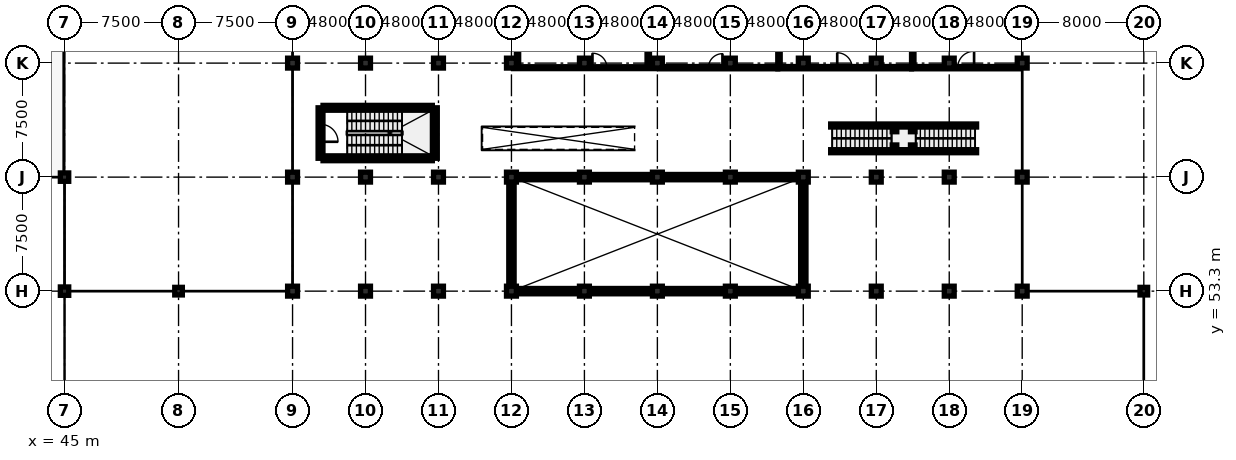
"""IFC4 building model, lengths in metres.
Left out: names, types, materials, properties, quantities, classifications, styles, units other than length and angle.
Written with IfcOpenShell. Run it as: python <this file> out.ifc"""

import sys

from ifc_helpers import new_model, si_unit, direction, frame, frame_2d, origin, origin_2d, place, context, subcontext, project, spatial, rectangle, circle, i_section, extrude, element, fill, save


model = new_model("IFC4")
c1 = context("Model", 3, precision=1e-05, world=origin(), true_north=direction((0.0, 1.0)))
c2 = subcontext(c1, "Body", "Model", "MODEL_VIEW")
j1 = project(units=[si_unit("LENGTHUNIT", "METRE"), si_unit("PLANEANGLEUNIT", "RADIAN")], contexts=[c1])
p1 = place(None, origin())
s1 = spatial("IfcSite", under=j1, at=p1, CompositionType="ELEMENT")
p2 = place(p1, origin())
s2 = spatial("IfcBuilding", under=s1, at=p2, CompositionType="ELEMENT")
p3 = place(p2, frame((0.0, 0.0, 5.0)))
s3 = spatial("IfcBuildingStorey", under=s2, at=p3, CompositionType="ELEMENT", Elevation=5.0)
for number, where, z_axis, x_axis in (
    (1, (45.0, 53.3, 0.0), (0.0, 0.0, 1.0), (1.0, 0.0, 0.0)),
    (2, (45.0, 60.8, 0.0), (0.0, 0.0, 1.0), (1.0, 0.0, 0.0)),
):
    element("IfcColumn", number, at=place(p3, frame(where, z_axis=z_axis, x_axis=x_axis)), inside=s3, PredefinedType="COLUMN", context=c2, shape_type="SweptSolid", body=[
        extrude(rectangle(XDim=0.55, YDim=0.55, at=origin_2d()), origin(), (0.0, 0.0, 1.0), 4.2),
    ])
p4 = place(p3, frame((52.5, 53.3, 0.0), z_axis=(0.0, 0.0, 1.0), x_axis=(1.0, 0.0, 0.0)))
e3 = element("IfcColumn", 3, at=p4, inside=s3, PredefinedType="COLUMN", context=c2, shape_type="SweptSolid", body=[
    extrude(rectangle(XDim=0.5, YDim=0.5, at=origin_2d()), origin(), (0.0, 0.0, 1.0), 4.206),
])
p5 = place(p3, frame((60.0, 53.3, 0.0), z_axis=(0.0, 0.0, 1.0), x_axis=(1.0, 0.0, 0.0)))
e4 = element("IfcColumn", 4, at=p5, inside=s3, PredefinedType="COLUMN", context=c2, shape_type="SweptSolid", body=[
    extrude(circle(Radius=0.325, at=origin_2d()), origin(), (0.0, 0.0, 1.0), 5.4),
])
for number, where, z_axis, x_axis in (
    (5, (60.0, 60.8, 0.0), (0.0, 0.0, 1.0), (1.0, 0.0, 0.0)),
    (6, (60.0, 68.3, 0.0), (0.0, 0.0, 1.0), (1.0, 0.0, 0.0)),
):
    element("IfcColumn", number, at=place(p3, frame(where, z_axis=z_axis, x_axis=x_axis)), inside=s3, PredefinedType="COLUMN", context=c2, shape_type="SweptSolid", body=[
        extrude(circle(Radius=0.325, at=origin_2d()), origin(), (0.0, 0.0, 1.0), 4.2),
    ])
p6 = place(p3, frame((64.8, 53.3, 0.0), z_axis=(0.0, 0.0, 1.0), x_axis=(1.0, 0.0, 0.0)))
e7 = element("IfcColumn", 7, at=p6, inside=s3, PredefinedType="COLUMN", context=c2, shape_type="SweptSolid", body=[
    extrude(circle(Radius=0.325, at=origin_2d()), origin(), (0.0, 0.0, 1.0), 5.4),
])
for number, where, z_axis, x_axis in (
    (8, (64.8, 60.8, 0.0), (0.0, 0.0, 1.0), (1.0, 0.0, 0.0)),
    (9, (64.8, 68.3, 0.0), (0.0, 0.0, 1.0), (1.0, 0.0, 0.0)),
):
    element("IfcColumn", number, at=place(p3, frame(where, z_axis=z_axis, x_axis=x_axis)), inside=s3, PredefinedType="COLUMN", context=c2, shape_type="SweptSolid", body=[
        extrude(circle(Radius=0.325, at=origin_2d()), origin(), (0.0, 0.0, 1.0), 4.2),
    ])
p7 = place(p3, frame((69.6, 53.3, 0.0), z_axis=(0.0, 0.0, 1.0), x_axis=(1.0, 0.0, 0.0)))
e10 = element("IfcColumn", 10, at=p7, inside=s3, PredefinedType="COLUMN", context=c2, shape_type="SweptSolid", body=[
    extrude(circle(Radius=0.325, at=origin_2d()), origin(), (0.0, 0.0, 1.0), 5.4),
])
for number, where, z_axis, x_axis in (
    (11, (69.6, 60.8, 0.0), (0.0, 0.0, 1.0), (1.0, 0.0, 0.0)),
    (12, (69.6, 68.3, 0.0), (0.0, 0.0, 1.0), (1.0, 0.0, 0.0)),
):
    element("IfcColumn", number, at=place(p3, frame(where, z_axis=z_axis, x_axis=x_axis)), inside=s3, PredefinedType="COLUMN", context=c2, shape_type="SweptSolid", body=[
        extrude(circle(Radius=0.325, at=origin_2d()), origin(), (0.0, 0.0, 1.0), 4.2),
    ])
p8 = place(p3, frame((74.4, 53.3, 0.0), z_axis=(0.0, 0.0, 1.0), x_axis=(1.0, 0.0, 0.0)))
e13 = element("IfcColumn", 13, at=p8, inside=s3, PredefinedType="COLUMN", context=c2, shape_type="SweptSolid", body=[
    extrude(circle(Radius=0.325, at=origin_2d()), origin(), (0.0, 0.0, 1.0), 5.4),
])
p9 = place(p3, frame((74.4, 68.3, 0.0), z_axis=(0.0, 0.0, 1.0), x_axis=(1.0, 0.0, 0.0)))
e14 = element("IfcColumn", 14, at=p9, inside=s3, PredefinedType="COLUMN", context=c2, shape_type="SweptSolid", body=[
    extrude(circle(Radius=0.325, at=origin_2d()), origin(), (0.0, 0.0, 1.0), 4.2),
])
p10 = place(p3, frame((79.2, 53.3, 0.0), z_axis=(0.0, 0.0, 1.0), x_axis=(1.0, 0.0, 0.0)))
e15 = element("IfcColumn", 15, at=p10, inside=s3, PredefinedType="COLUMN", context=c2, shape_type="SweptSolid", body=[
    extrude(circle(Radius=0.325, at=origin_2d()), origin(), (0.0, 0.0, 1.0), 5.4),
])
p11 = place(p3, frame((79.2, 68.3, 0.0), z_axis=(0.0, 0.0, 1.0), x_axis=(1.0, 0.0, 0.0)))
e16 = element("IfcColumn", 16, at=p11, inside=s3, PredefinedType="COLUMN", context=c2, shape_type="SweptSolid", body=[
    extrude(circle(Radius=0.325, at=origin_2d()), origin(), (0.0, 0.0, 1.0), 4.2),
])
p12 = place(p3, frame((84.0, 53.3, 0.0), z_axis=(0.0, 0.0, 1.0), x_axis=(1.0, 0.0, 0.0)))
e17 = element("IfcColumn", 17, at=p12, inside=s3, PredefinedType="COLUMN", context=c2, shape_type="SweptSolid", body=[
    extrude(circle(Radius=0.325, at=origin_2d()), origin(), (0.0, 0.0, 1.0), 5.4),
])
p13 = place(p3, frame((84.0, 68.3, 0.0), z_axis=(0.0, 0.0, 1.0), x_axis=(1.0, 0.0, 0.0)))
e18 = element("IfcColumn", 18, at=p13, inside=s3, PredefinedType="COLUMN", context=c2, shape_type="SweptSolid", body=[
    extrude(circle(Radius=0.325, at=origin_2d()), origin(), (0.0, 0.0, 1.0), 4.2),
])
p14 = place(p3, frame((88.8, 53.3, 0.0), z_axis=(0.0, 0.0, 1.0), x_axis=(1.0, 0.0, 0.0)))
e19 = element("IfcColumn", 19, at=p14, inside=s3, PredefinedType="COLUMN", context=c2, shape_type="SweptSolid", body=[
    extrude(circle(Radius=0.325, at=origin_2d()), origin(), (0.0, 0.0, 1.0), 5.4),
])
for number, where, z_axis, x_axis in (
    (20, (88.8, 60.8, 0.0), (0.0, 0.0, 1.0), (1.0, 0.0, 0.0)),
    (21, (88.8, 68.3, 0.0), (0.0, 0.0, 1.0), (1.0, 0.0, 0.0)),
):
    element("IfcColumn", number, at=place(p3, frame(where, z_axis=z_axis, x_axis=x_axis)), inside=s3, PredefinedType="COLUMN", context=c2, shape_type="SweptSolid", body=[
        extrude(circle(Radius=0.325, at=origin_2d()), origin(), (0.0, 0.0, 1.0), 4.2),
    ])
p15 = place(p3, frame((93.6, 53.3, 0.0), z_axis=(0.0, 0.0, 1.0), x_axis=(1.0, 0.0, 0.0)))
e22 = element("IfcColumn", 22, at=p15, inside=s3, PredefinedType="COLUMN", context=c2, shape_type="SweptSolid", body=[
    extrude(circle(Radius=0.325, at=origin_2d()), origin(), (0.0, 0.0, 1.0), 5.4),
])
for number, where, z_axis, x_axis in (
    (23, (93.6, 60.8, 0.0), (0.0, 0.0, 1.0), (1.0, 0.0, 0.0)),
    (24, (93.6, 68.3, 0.0), (0.0, 0.0, 1.0), (1.0, 0.0, 0.0)),
):
    element("IfcColumn", number, at=place(p3, frame(where, z_axis=z_axis, x_axis=x_axis)), inside=s3, PredefinedType="COLUMN", context=c2, shape_type="SweptSolid", body=[
        extrude(circle(Radius=0.325, at=origin_2d()), origin(), (0.0, 0.0, 1.0), 4.2),
    ])
p16 = place(p3, frame((98.4, 53.3, 0.0), z_axis=(0.0, 0.0, 1.0), x_axis=(1.0, 0.0, 0.0)))
e25 = element("IfcColumn", 25, at=p16, inside=s3, PredefinedType="COLUMN", context=c2, shape_type="SweptSolid", body=[
    extrude(circle(Radius=0.325, at=origin_2d()), origin(), (0.0, 0.0, 1.0), 5.4),
])
p17 = place(p3, frame((98.4, 68.3, 0.0), z_axis=(0.0, 0.0, 1.0), x_axis=(1.0, 0.0, 0.0)))
e26 = element("IfcColumn", 26, at=p17, inside=s3, PredefinedType="COLUMN", context=c2, shape_type="SweptSolid", body=[
    extrude(circle(Radius=0.325, at=origin_2d()), origin(), (0.0, 0.0, 1.0), 4.2),
])
p18 = place(p3, frame((103.2, 53.3, 0.0), z_axis=(0.0, 0.0, 1.0), x_axis=(1.0, 0.0, 0.0)))
e27 = element("IfcColumn", 27, at=p18, inside=s3, PredefinedType="COLUMN", context=c2, shape_type="SweptSolid", body=[
    extrude(circle(Radius=0.325, at=origin_2d()), origin(), (0.0, 0.0, 1.0), 5.4),
])
p19 = place(p3, frame((103.2, 68.3, 0.0), z_axis=(0.0, 0.0, 1.0), x_axis=(1.0, 0.0, 0.0)))
e28 = element("IfcColumn", 28, at=p19, inside=s3, PredefinedType="COLUMN", context=c2, shape_type="SweptSolid", body=[
    extrude(circle(Radius=0.325, at=origin_2d()), origin(), (0.0, 0.0, 1.0), 4.2),
])
p20 = place(p3, frame((108.0, 53.3, 0.0), z_axis=(0.0, 0.0, 1.0), x_axis=(1.0, 0.0, 0.0)))
e29 = element("IfcColumn", 29, at=p20, inside=s3, PredefinedType="COLUMN", context=c2, shape_type="SweptSolid", body=[
    extrude(circle(Radius=0.325, at=origin_2d()), origin(), (0.0, 0.0, 1.0), 5.4),
])
for number, where, z_axis, x_axis in (
    (30, (108.0, 60.8, 0.0), (0.0, 0.0, 1.0), (1.0, 0.0, 0.0)),
    (31, (108.0, 68.3, 0.0), (0.0, 0.0, 1.0), (1.0, 0.0, 0.0)),
):
    element("IfcColumn", number, at=place(p3, frame(where, z_axis=z_axis, x_axis=x_axis)), inside=s3, PredefinedType="COLUMN", context=c2, shape_type="SweptSolid", body=[
        extrude(circle(Radius=0.325, at=origin_2d()), origin(), (0.0, 0.0, 1.0), 4.2),
    ])
p21 = place(p3, frame((116.0, 53.3, 0.0), z_axis=(0.0, 0.0, 1.0), x_axis=(1.0, 0.0, 0.0)))
e32 = element("IfcColumn", 32, at=p21, inside=s3, PredefinedType="COLUMN", context=c2, shape_type="SweptSolid", body=[
    extrude(rectangle(XDim=0.5, YDim=0.5, at=origin_2d()), origin(), (0.0, 0.0, 1.0), 4.206),
])
for number, where, z_axis, x_axis in (
    (33, (74.4, 60.8, 0.0), (0.0, 0.0, 1.0), (1.0, 0.0, 0.0)),
    (34, (79.2, 60.8, 0.0), (0.0, 0.0, 1.0), (1.0, 0.0, 0.0)),
    (35, (84.0, 60.8, 0.0), (0.0, 0.0, 1.0), (1.0, 0.0, 0.0)),
    (36, (98.4, 60.8, 0.0), (0.0, 0.0, 1.0), (1.0, 0.0, 0.0)),
    (37, (103.2, 60.8, 0.0), (0.0, 0.0, 1.0), (1.0, 0.0, 0.0)),
):
    element("IfcColumn", number, at=place(p3, frame(where, z_axis=z_axis, x_axis=x_axis)), inside=s3, PredefinedType="COLUMN", context=c2, shape_type="SweptSolid", body=[
        extrude(circle(Radius=0.325, at=origin_2d()), origin(), (0.0, 0.0, 1.0), 4.2),
    ])
p22 = place(p3, frame((74.4, 60.475, 0.0), z_axis=(0.0, 0.0, 1.0), x_axis=(0.0, -1.0, 0.0)))
e38 = element("IfcWall", 38, at=p22, inside=s3, PredefinedType="SOLIDWALL", context=c2, shape_type="SweptSolid", body=[
    extrude(rectangle(XDim=6.85, YDim=0.35, at=frame_2d((3.425, 0.0))), origin(), (0.0, 0.0, 1.0), 3.14),
])
p23 = place(p3, frame((74.725, 53.3, 0.0), z_axis=(0.0, 0.0, 1.0), x_axis=(1.0, 0.0, 0.0)))
e39 = element("IfcWall", 39, at=p23, inside=s3, PredefinedType="SOLIDWALL", context=c2, shape_type="SweptSolid", body=[
    extrude(rectangle(XDim=4.15, YDim=0.35, at=frame_2d((2.075, 0.0))), origin(), (0.0, 0.0, 1.0), 3.14),
])
for number, where, z_axis, x_axis in (
    (40, (79.525, 53.3, 0.0), (0.0, 0.0, 1.0), (1.0, 0.0, 0.0)),
    (41, (84.325, 53.3, 0.0), (0.0, 0.0, 1.0), (1.0, 0.0, 0.0)),
):
    element("IfcWall", number, at=place(p3, frame(where, z_axis=z_axis, x_axis=x_axis)), inside=s3, PredefinedType="SOLIDWALL", context=c2, shape_type="SweptSolid", body=[
        extrude(rectangle(XDim=4.15, YDim=0.35, at=frame_2d((2.075, 0.0))), origin(), (0.0, 0.0, 1.0), 3.14),
    ])
p24 = place(p3, frame((89.125, 53.3, 0.0), z_axis=(0.0, 0.0, 1.0), x_axis=(1.0, 0.0, 0.0)))
e42 = element("IfcWall", 42, at=p24, inside=s3, PredefinedType="SOLIDWALL", context=c2, shape_type="SweptSolid", body=[
    extrude(rectangle(XDim=4.15, YDim=0.35, at=frame_2d((2.075, 0.0))), origin(), (0.0, 0.0, 1.0), 3.14),
])
p25 = place(p3, frame((93.6, 53.625, 0.0), z_axis=(0.0, 0.0, 1.0), x_axis=(0.0, 1.0, 0.0)))
e43 = element("IfcWall", 43, at=p25, inside=s3, PredefinedType="SOLIDWALL", context=c2, shape_type="SweptSolid", body=[
    extrude(rectangle(XDim=6.85, YDim=0.35, at=frame_2d((3.425, 0.0))), origin(), (0.0, 0.0, 1.0), 3.14),
])
p26 = place(p3, frame((93.275, 60.8, 0.0), z_axis=(0.0, 0.0, 1.0), x_axis=(-1.0, 0.0, 0.0)))
e44 = element("IfcWall", 44, at=p26, inside=s3, PredefinedType="SOLIDWALL", context=c2, shape_type="SweptSolid", body=[
    extrude(rectangle(XDim=4.15, YDim=0.35, at=frame_2d((2.075, 0.0))), origin(), (0.0, 0.0, 1.0), 3.14),
])
for number, where, z_axis, x_axis in (
    (45, (88.475, 60.8, 0.0), (0.0, 0.0, 1.0), (-1.0, 0.0, 0.0)),
    (46, (83.675, 60.8, 0.0), (0.0, 0.0, 1.0), (-1.0, 0.0, 0.0)),
):
    element("IfcWall", number, at=place(p3, frame(where, z_axis=z_axis, x_axis=x_axis)), inside=s3, PredefinedType="SOLIDWALL", context=c2, shape_type="SweptSolid", body=[
        extrude(rectangle(XDim=4.15, YDim=0.35, at=frame_2d((2.075, 0.0))), origin(), (0.0, 0.0, 1.0), 3.14),
    ])
p27 = place(p3, frame((78.875, 60.8, 0.0), z_axis=(0.0, 0.0, 1.0), x_axis=(-1.0, 0.0, 0.0)))
e47 = element("IfcWall", 47, at=p27, inside=s3, PredefinedType="SOLIDWALL", context=c2, shape_type="SweptSolid", body=[
    extrude(rectangle(XDim=4.15, YDim=0.35, at=frame_2d((2.075, 0.0))), origin(), (0.0, 0.0, 1.0), 3.14),
])
p28 = place(p3, frame((62.005, 62.04, 0.0), z_axis=(0.0, 0.0, 1.0), x_axis=(1.0, 0.0, 0.0)))
e48 = element("IfcWall", 48, at=p28, inside=s3, PredefinedType="SHEAR", context=c2, shape_type="SweptSolid", body=[
    extrude(rectangle(XDim=7.19, YDim=0.32, at=frame_2d((3.595, 0.0))), origin(), (0.0, 0.0, 1.0), 4.2),
])
p29 = place(p3, frame((69.36, 62.04, 0.0), z_axis=(0.0, 0.0, 1.0), x_axis=(0.0, 1.0, 0.0)))
e49 = element("IfcWall", 49, at=p29, inside=s3, PredefinedType="SHEAR", context=c2, shape_type="SweptSolid", body=[
    extrude(rectangle(XDim=3.32, YDim=0.32, at=frame_2d((1.66, 0.0))), origin(), (0.0, 0.0, 1.0), 4.2),
])
p30 = place(p3, frame((69.195, 65.36, 0.0), z_axis=(0.0, 0.0, 1.0), x_axis=(-1.0, 0.0, 0.0)))
e50 = element("IfcWall", 50, at=p30, inside=s3, PredefinedType="SHEAR", context=c2, shape_type="SweptSolid", body=[
    extrude(rectangle(XDim=7.19, YDim=0.32, at=frame_2d((3.595, 0.0))), origin(), (0.0, 0.0, 1.0), 4.2),
])
p31 = place(p3, frame((61.84, 65.36, 0.0), z_axis=(0.0, 0.0, 1.0), x_axis=(0.0, -1.0, 0.0)))
e51 = element("IfcWall", 51, at=p31, inside=s3, PredefinedType="SHEAR", context=c2, shape_type="SweptSolid", body=[
    extrude(rectangle(XDim=3.32, YDim=0.32, at=frame_2d((1.66, 0.0))), origin(), (0.0, 0.0, 1.0), 4.2),
])
p32 = place(p31, frame((1.085, 0.0, 0.0)))
e52 = element("IfcOpeningElement", 52, at=p32, cuts=e51, PredefinedType="OPENING", context=c2, shape_type="SweptSolid", body=[
    extrude(rectangle(XDim=1.15, YDim=2.15, at=frame_2d((0.575, 1.075))), frame((0.0, 0.172, 0.0), z_axis=(0.0, -1.0, 0.0), x_axis=(1.0, 0.0, 0.0)), (0.0, 0.0, 1.0), 0.344),
])
for number, where, z_axis, x_axis in (
    (53, (95.4, 62.505, 0.0), (0.0, 0.0, 1.0), (1.0, 0.0, 0.0)),
    (54, (95.4, 64.195, 0.0), (0.0, 0.0, 1.0), (1.0, 0.0, 0.0)),
):
    element("IfcWall", number, at=place(p3, frame(where, z_axis=z_axis, x_axis=x_axis)), inside=s3, PredefinedType="PARTITIONING", context=c2, shape_type="SweptSolid", body=[
        extrude(rectangle(XDim=9.6, YDim=0.2, at=frame_2d((4.8, 0.0))), origin(), (0.0, 0.0, 1.0), 3.14),
    ])
for number, where, z_axis, x_axis in (
    (55, (99.6, 62.765, 0.0), (0.0, 0.0, 1.0), (1.0, 0.0, 0.0)),
    (56, (100.8, 62.765, 0.0), (0.0, 0.0, 1.0), (1.0, 0.0, 0.0)),
    (57, (100.8, 63.935, 0.0), (0.0, 0.0, 1.0), (1.0, 0.0, 0.0)),
    (58, (99.6, 63.935, 0.0), (0.0, 0.0, 1.0), (1.0, 0.0, 0.0)),
):
    element("IfcColumn", number, at=place(p3, frame(where, z_axis=z_axis, x_axis=x_axis)), inside=s3, PredefinedType="COLUMN", context=c2, shape_type="SweptSolid", body=[
        extrude(i_section(OverallWidth=0.3, OverallDepth=0.3, WebThickness=0.011, FlangeThickness=0.019, FilletRadius=0.027, at=origin_2d()), origin(), (0.0, 0.0, 1.0), 2.05),
    ])
p33 = place(p3, frame((74.537, 68.0, 0.0), z_axis=(0.0, 0.0, 1.0), x_axis=(1.0, 0.0, 0.0)))
e59 = element("IfcWall", 59, at=p33, inside=s3, PredefinedType="PARTITIONING", context=c2, shape_type="SweptSolid", body=[
    extrude(rectangle(XDim=9.326, YDim=0.125, at=frame_2d((4.663, 0.0))), origin(), (0.0, 0.0, 1.0), 3.14),
])
p34 = place(p33, frame((5.193, 0.0, 0.0)))
e60 = element("IfcOpeningElement", 60, at=p34, cuts=e59, PredefinedType="OPENING", context=c2, shape_type="SweptSolid", body=[
    extrude(rectangle(XDim=0.95, YDim=2.15, at=frame_2d((0.475, 1.075))), frame((0.0, 0.074, 0.0), z_axis=(0.0, -1.0, 0.0), x_axis=(1.0, 0.0, 0.0)), (0.0, 0.0, 1.0), 0.149),
])
p35 = place(p3, frame((84.137, 68.0, 0.0), z_axis=(0.0, 0.0, 1.0), x_axis=(1.0, 0.0, 0.0)))
e61 = element("IfcWall", 61, at=p35, inside=s3, PredefinedType="PARTITIONING", context=c2, shape_type="SweptSolid", body=[
    extrude(rectangle(XDim=7.778, YDim=0.15, at=frame_2d((3.889, 0.0))), origin(), (0.0, 0.0, 1.0), 3.14),
])
p36 = place(p35, frame((3.223, 0.0, 0.0)))
e62 = element("IfcOpeningElement", 62, at=p36, cuts=e61, PredefinedType="OPENING", context=c2, shape_type="SweptSolid", body=[
    extrude(rectangle(XDim=0.92, YDim=2.1, at=frame_2d((0.46, 1.05))), frame((0.0, 0.087, 0.0), z_axis=(0.0, -1.0, 0.0), x_axis=(1.0, 0.0, 0.0)), (0.0, 0.0, 1.0), 0.174),
])
p37 = place(p3, frame((91.927, 68.0, 0.0), z_axis=(0.0, 0.0, 1.0), x_axis=(1.0, 0.0, 0.0)))
e63 = element("IfcWall", 63, at=p37, inside=s3, PredefinedType="PARTITIONING", context=c2, shape_type="SweptSolid", body=[
    extrude(rectangle(XDim=8.788, YDim=0.15, at=frame_2d((4.394, 0.0))), origin(), (0.0, 0.0, 1.0), 3.14),
])
p38 = place(p37, frame((3.904, 0.0, 0.0)))
e64 = element("IfcOpeningElement", 64, at=p38, cuts=e63, PredefinedType="OPENING", context=c2, shape_type="SweptSolid", body=[
    extrude(rectangle(XDim=0.98, YDim=2.12, at=frame_2d((0.49, 1.06))), frame((0.0, 0.087, 0.0), z_axis=(0.0, -1.0, 0.0), x_axis=(1.0, 0.0, 0.0)), (0.0, 0.0, 1.0), 0.174),
])
p39 = place(p3, frame((100.727, 68.0, 0.0), z_axis=(0.0, 0.0, 1.0), x_axis=(1.0, 0.0, 0.0)))
e65 = element("IfcWall", 65, at=p39, inside=s3, PredefinedType="PARTITIONING", context=c2, shape_type="SweptSolid", body=[
    extrude(rectangle(XDim=7.136, YDim=0.15, at=frame_2d((3.568, 0.0))), origin(), (0.0, 0.0, 1.0), 3.14),
])
p40 = place(p39, frame((3.028, 0.0, 0.0)))
e66 = element("IfcOpeningElement", 66, at=p40, cuts=e65, PredefinedType="OPENING", context=c2, shape_type="SweptSolid", body=[
    extrude(rectangle(XDim=1.08, YDim=2.18, at=frame_2d((0.54, 1.09))), frame((0.0, 0.087, 0.0), z_axis=(0.0, -1.0, 0.0), x_axis=(1.0, 0.0, 0.0)), (0.0, 0.0, 1.0), 0.174),
])
p41 = place(p3, frame((74.8, 68.074, 0.0), z_axis=(0.0, 0.0, 1.0), x_axis=(0.0, 1.0, 0.0)))
e67 = element("IfcWall", 67, at=p41, inside=s3, PredefinedType="PARTITIONING", context=c2, shape_type="SweptSolid", body=[
    extrude(rectangle(XDim=7.624, YDim=0.15, at=frame_2d((3.812, 0.0))), origin(), (0.0, 0.0, 1.0), 3.14),
])
p42 = place(p3, frame((83.4, 68.074, 0.0), z_axis=(0.0, 0.0, 1.0), x_axis=(0.0, 1.0, 0.0)))
e68 = element("IfcWall", 68, at=p42, inside=s3, PredefinedType="PARTITIONING", context=c2, shape_type="SweptSolid", body=[
    extrude(rectangle(XDim=7.624, YDim=0.16, at=frame_2d((3.812, 0.0))), origin(), (0.0, 0.0, 1.0), 3.14),
])
p43 = place(p3, frame((92.0, 68.087, 0.0), z_axis=(0.0, 0.0, 1.0), x_axis=(0.0, 1.0, 0.0)))
e69 = element("IfcWall", 69, at=p43, inside=s3, PredefinedType="PARTITIONING", context=c2, shape_type="SweptSolid", body=[
    extrude(rectangle(XDim=7.426, YDim=0.16, at=frame_2d((3.713, 0.0))), origin(), (0.0, 0.0, 1.0), 3.14),
])
p44 = place(p3, frame((100.8, 68.087, 0.0), z_axis=(0.0, 0.0, 1.0), x_axis=(0.0, 1.0, 0.0)))
e70 = element("IfcWall", 70, at=p44, inside=s3, PredefinedType="PARTITIONING", context=c2, shape_type="SweptSolid", body=[
    extrude(rectangle(XDim=7.611, YDim=0.16, at=frame_2d((3.806, 0.0))), origin(), (0.0, 0.0, 1.0), 3.14),
])
p45 = place(p32, origin())
e71 = element("IfcDoor", 71, at=p45, inside=s3, OperationType="SINGLE_SWING_RIGHT", PredefinedType="DOOR", context=c2, shape_type="SweptSolid", body=[
    extrude(rectangle(XDim=1.15, YDim=2.15, at=frame_2d((0.575, 1.075))), frame((0.0, 0.025, 0.0), z_axis=(0.0, -1.0, 0.0), x_axis=(1.0, 0.0, 0.0)), (0.0, 0.0, 1.0), 0.05),
])
fill(e52, e71)
p46 = place(p34, origin())
e72 = element("IfcDoor", 72, at=p46, inside=s3, OperationType="SINGLE_SWING_LEFT", PredefinedType="DOOR", context=c2, shape_type="SweptSolid", body=[
    extrude(rectangle(XDim=0.95, YDim=2.15, at=frame_2d((0.475, 1.075))), frame((0.0, 0.025, 0.0), z_axis=(0.0, -1.0, 0.0), x_axis=(1.0, 0.0, 0.0)), (0.0, 0.0, 1.0), 0.05),
])
fill(e60, e72)
p47 = place(p36, origin())
e73 = element("IfcDoor", 73, at=p47, inside=s3, OperationType="SINGLE_SWING_RIGHT", PredefinedType="DOOR", context=c2, shape_type="SweptSolid", body=[
    extrude(rectangle(XDim=0.92, YDim=2.1, at=frame_2d((0.46, 1.05))), frame((0.0, 0.025, 0.0), z_axis=(0.0, -1.0, 0.0), x_axis=(1.0, 0.0, 0.0)), (0.0, 0.0, 1.0), 0.05),
])
fill(e62, e73)
p48 = place(p38, origin())
e74 = element("IfcDoor", 74, at=p48, inside=s3, OperationType="SINGLE_SWING_LEFT", PredefinedType="DOOR", context=c2, shape_type="SweptSolid", body=[
    extrude(rectangle(XDim=0.98, YDim=2.12, at=frame_2d((0.49, 1.06))), frame((0.0, 0.025, 0.0), z_axis=(0.0, -1.0, 0.0), x_axis=(1.0, 0.0, 0.0)), (0.0, 0.0, 1.0), 0.05),
])
fill(e64, e74)
p49 = place(p40, origin())
e75 = element("IfcDoor", 75, at=p49, inside=s3, OperationType="SINGLE_SWING_RIGHT", PredefinedType="DOOR", context=c2, shape_type="SweptSolid", body=[
    extrude(rectangle(XDim=1.08, YDim=2.18, at=frame_2d((0.54, 1.09))), frame((0.0, 0.025, 0.0), z_axis=(0.0, -1.0, 0.0), x_axis=(1.0, 0.0, 0.0)), (0.0, 0.0, 1.0), 0.05),
])
fill(e66, e75)
save(model, sys.argv[1])
